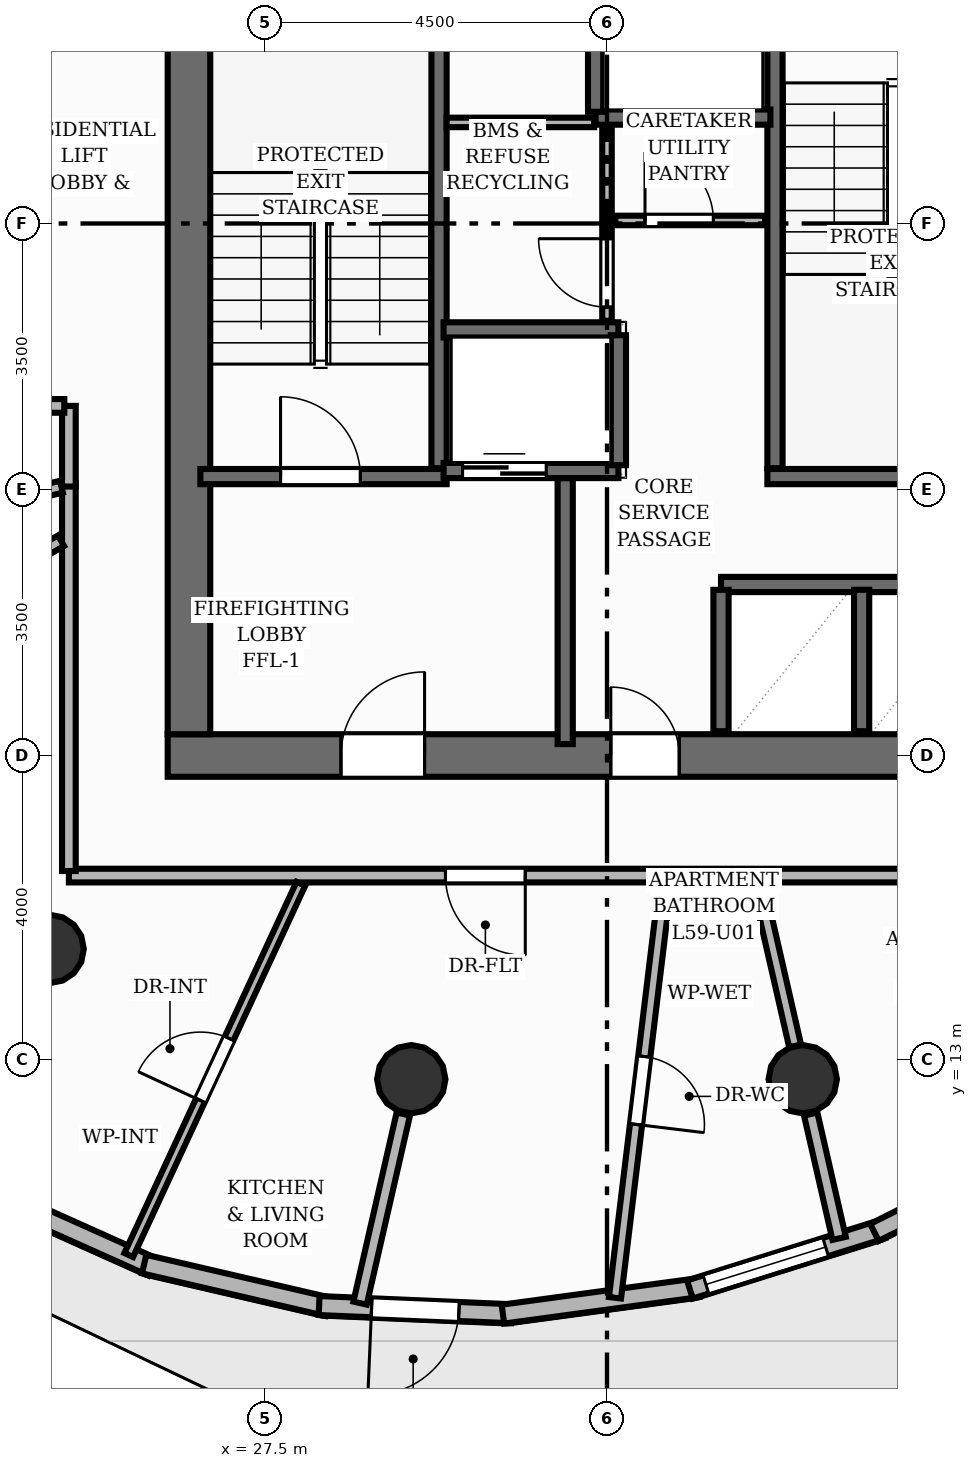
"""IFC4 building model, lengths in metres.
Left out: names, types, materials, properties, quantities, classifications, styles, units other than length and angle.
Written with IfcOpenShell. Run it as: python <this file> out.ifc"""

import sys

from ifc_helpers import new_model, si_unit, direction, frame, frame_2d, origin, origin_2d, place, context, subcontext, project, spatial, rectangle, circle, extrude, element, fill, save


model = new_model("IFC4")
c1 = context("Model", 3, precision=1e-05, world=origin(), true_north=direction((0.0, 1.0)))
c2 = subcontext(c1, "Body", "Model", "MODEL_VIEW")
j1 = project(units=[si_unit("LENGTHUNIT", "METRE"), si_unit("PLANEANGLEUNIT", "RADIAN")], contexts=[c1])
p1 = place(None, origin())
s1 = spatial("IfcSite", under=j1, at=p1, CompositionType="ELEMENT")
p2 = place(p1, origin())
s2 = spatial("IfcBuilding", under=s1, at=p2, CompositionType="ELEMENT")
p3 = place(p2, frame((0.0, 0.0, 198.24)))
s3 = spatial("IfcBuildingStorey", under=s2, at=p3, CompositionType="ELEMENT", Elevation=198.24)
p4 = place(p3, frame((26.22, 17.0, 0.0), z_axis=(0.0, 0.0, 1.0), x_axis=(1.0, 0.0, 0.0)))
e1 = element("IfcWall", 1, at=p4, inside=s3, PredefinedType="SHEAR", context=c2, shape_type="SweptSolid", body=[
    extrude(rectangle(XDim=11.56, YDim=0.56, at=frame_2d((5.78, 0.0))), origin(), (0.0, 0.0, 1.0), 3.2),
])
p5 = place(p4, frame((2.28, 0.0, 0.0)))
e2 = element("IfcOpeningElement", 2, at=p5, cuts=e1, PredefinedType="OPENING", context=c2, shape_type="SweptSolid", body=[
    extrude(rectangle(XDim=1.1, YDim=2.15, at=frame_2d((0.55, 1.075))), frame((0.0, 0.29, 0.0), z_axis=(0.0, -1.0, 0.0), x_axis=(1.0, 0.0, 0.0)), (0.0, 0.0, 1.0), 0.58),
])
p6 = place(p4, frame((5.83, 0.0, 0.0)))
e3 = element("IfcOpeningElement", 3, at=p6, cuts=e1, PredefinedType="OPENING", context=c2, shape_type="SweptSolid", body=[
    extrude(rectangle(XDim=0.9, YDim=2.1, at=frame_2d((0.45, 1.05))), frame((0.0, 0.29, 0.0), z_axis=(0.0, -1.0, 0.0), x_axis=(1.0, 0.0, 0.0)), (0.0, 0.0, 1.0), 0.58),
])
p7 = place(p3, frame((26.5, 17.28, 0.0), z_axis=(0.0, 0.0, 1.0), x_axis=(0.0, 1.0, 0.0)))
e4 = element("IfcWall", 4, at=p7, inside=s3, PredefinedType="SHEAR", context=c2, shape_type="SweptSolid", body=[
    extrude(rectangle(XDim=13.44, YDim=0.56, at=frame_2d((6.72, 0.0))), origin(), (0.0, 0.0, 1.0), 3.2),
])
for number, where, z_axis, x_axis in (
    (5, (24.667, 14.455, 0.0), (0.0, 0.0, 1.0), (1.0, 0.0, 0.0)),
    (6, (29.425, 12.74, 0.0), (0.0, 0.0, 1.0), (1.0, 0.0, 0.0)),
    (7, (34.575, 12.74, 0.0), (0.0, 0.0, 1.0), (1.0, 0.0, 0.0)),
):
    element("IfcColumn", number, at=place(p3, frame(where, z_axis=z_axis, x_axis=x_axis)), inside=s3, PredefinedType="COLUMN", context=c2, shape_type="SweptSolid", body=[
        extrude(circle(Radius=0.45, at=origin_2d()), origin(), (0.0, 0.0, 1.0), 3.2),
    ])
p8 = place(p3, frame((26.018, 10.271, 0.0), z_axis=(0.0, 0.0, 1.0), x_axis=(-0.912451283158, 0.409185356365, 0.0)))
e8 = element("IfcWall", 8, at=p8, inside=s3, PredefinedType="SOLIDWALL", context=c2, shape_type="SweptSolid", body=[
    extrude(rectangle(XDim=2.437, YDim=0.25, at=frame_2d((1.218, 0.0))), origin(), (0.0, 0.0, 1.0), 2.96),
])
p9 = place(p3, frame((28.324, 9.747, 0.0), z_axis=(0.0, 0.0, 1.0), x_axis=(-0.974096425092, 0.226133046286, 0.0)))
e9 = element("IfcWall", 9, at=p9, inside=s3, PredefinedType="SOLIDWALL", context=c2, shape_type="SweptSolid", body=[
    extrude(rectangle(XDim=2.478, YDim=0.25, at=frame_2d((1.239, 0.0))), origin(), (0.0, 0.0, 1.0), 2.96),
])
p10 = place(p3, frame((30.742, 9.655, 0.0), z_axis=(0.0, 0.0, 1.0), x_axis=(-0.999099670747, 0.042424614469, 0.0)))
e10 = element("IfcWall", 10, at=p10, inside=s3, PredefinedType="SOLIDWALL", context=c2, shape_type="SweptSolid", body=[
    extrude(rectangle(XDim=2.532, YDim=0.25, at=frame_2d((1.266, 0.0))), origin(), (0.0, 0.0, 1.0), 2.96),
])
p11 = place(p10, frame((0.691, 0.0, 0.0)))
e11 = element("IfcOpeningElement", 11, at=p11, cuts=e10, PredefinedType="OPENING", context=c2, shape_type="SweptSolid", body=[
    extrude(rectangle(XDim=1.15, YDim=2.2, at=frame_2d((0.575, 1.1))), frame((0.0, 0.135, 0.0), z_axis=(0.0, -1.0, 0.0), x_axis=(1.0, 0.0, 0.0)), (0.0, 0.0, 1.0), 0.27),
])
p12 = place(p3, frame((33.199, 9.998, 0.0), z_axis=(0.0, 0.0, 1.0), x_axis=(-0.990951844978, -0.134217886046, 0.0)))
e12 = element("IfcWall", 12, at=p12, inside=s3, PredefinedType="SOLIDWALL", context=c2, shape_type="SweptSolid", body=[
    extrude(rectangle(XDim=2.592, YDim=0.25, at=frame_2d((1.296, 0.0))), origin(), (0.0, 0.0, 1.0), 2.96),
])
p13 = place(p3, frame((35.621, 10.766, 0.0), z_axis=(0.0, 0.0, 1.0), x_axis=(-0.954307768746, -0.298825505122, 0.0)))
e13 = element("IfcWall", 13, at=p13, inside=s3, PredefinedType="SOLIDWALL", context=c2, shape_type="SweptSolid", body=[
    extrude(rectangle(XDim=2.651, YDim=0.25, at=frame_2d((1.326, 0.0))), origin(), (0.0, 0.0, 1.0), 2.96),
])
p14 = place(p13, frame((0.78, 0.0, 0.85)))
e14 = element("IfcOpeningElement", 14, at=p14, cuts=e13, PredefinedType="OPENING", context=c2, shape_type="SweptSolid", body=[
    extrude(rectangle(XDim=1.65, YDim=1.52, at=frame_2d((0.825, 0.76))), frame((0.0, 0.135, 0.0), z_axis=(0.0, -1.0, 0.0), x_axis=(1.0, 0.0, 0.0)), (0.0, 0.0, 1.0), 0.27),
])
p15 = place(p3, frame((37.934, 11.937, 0.0), z_axis=(0.0, 0.0, 1.0), x_axis=(-0.893757522153, -0.448550433724, 0.0)))
e15 = element("IfcWall", 15, at=p15, inside=s3, PredefinedType="SOLIDWALL", context=c2, shape_type="SweptSolid", body=[
    extrude(rectangle(XDim=2.702, YDim=0.25, at=frame_2d((1.351, 0.0))), origin(), (0.0, 0.0, 1.0), 2.96),
])
p16 = place(p15, frame((0.526, 0.0, 0.85)))
e16 = element("IfcOpeningElement", 16, at=p16, cuts=e15, PredefinedType="OPENING", context=c2, shape_type="SweptSolid", body=[
    extrude(rectangle(XDim=1.65, YDim=1.55, at=frame_2d((0.825, 0.775))), frame((0.0, 0.135, 0.0), z_axis=(0.0, -1.0, 0.0), x_axis=(1.0, 0.0, 0.0)), (0.0, 0.0, 1.0), 0.27),
])
p17 = place(p3, frame((29.79, 20.78, 0.0), z_axis=(0.0, 0.0, 1.0), x_axis=(0.0, 1.0, 0.0)))
e17 = element("IfcWall", 17, at=p17, inside=s3, PredefinedType="SHEAR", context=c2, shape_type="SweptSolid", body=[
    extrude(rectangle(XDim=6.44, YDim=0.2, at=frame_2d((3.22, 0.0))), origin(), (0.0, 0.0, 1.0), 3.2),
])
p18 = place(p3, frame((26.65, 20.67, 0.0), z_axis=(0.0, 0.0, 1.0), x_axis=(1.0, 0.0, 0.0)))
e18 = element("IfcWall", 18, at=p18, inside=s3, PredefinedType="SHEAR", context=c2, shape_type="SweptSolid", body=[
    extrude(rectangle(XDim=3.24, YDim=0.2, at=frame_2d((1.62, 0.0))), origin(), (0.0, 0.0, 1.0), 3.2),
])
p19 = place(p18, frame((1.055, 0.0, 0.0)))
e19 = element("IfcOpeningElement", 19, at=p19, cuts=e18, PredefinedType="OPENING", context=c2, shape_type="SweptSolid", body=[
    extrude(rectangle(XDim=1.05, YDim=2.15, at=frame_2d((0.525, 1.075))), frame((0.0, 0.11, 0.0), z_axis=(0.0, -1.0, 0.0), x_axis=(1.0, 0.0, 0.0)), (0.0, 0.0, 1.0), 0.22),
])
p20 = place(p3, frame((34.21, 20.78, 0.0), z_axis=(0.0, 0.0, 1.0), x_axis=(0.0, 1.0, 0.0)))
e20 = element("IfcWall", 20, at=p20, inside=s3, PredefinedType="SHEAR", context=c2, shape_type="SweptSolid", body=[
    extrude(rectangle(XDim=6.44, YDim=0.2, at=frame_2d((3.22, 0.0))), origin(), (0.0, 0.0, 1.0), 3.2),
])
p21 = place(p3, frame((34.11, 20.67, 0.0), z_axis=(0.0, 0.0, 1.0), x_axis=(1.0, 0.0, 0.0)))
e21 = element("IfcWall", 21, at=p21, inside=s3, PredefinedType="SHEAR", context=c2, shape_type="SweptSolid", body=[
    extrude(rectangle(XDim=3.24, YDim=0.2, at=frame_2d((1.62, 0.0))), origin(), (0.0, 0.0, 1.0), 3.2),
])
p22 = place(p3, frame((31.45, 17.15, 0.0), z_axis=(0.0, 0.0, 1.0), x_axis=(0.0, 1.0, 0.0)))
e22 = element("IfcWall", 22, at=p22, inside=s3, PredefinedType="SHEAR", context=c2, shape_type="SweptSolid", body=[
    extrude(rectangle(XDim=3.5, YDim=0.2, at=frame_2d((1.75, 0.0))), origin(), (0.0, 0.0, 1.0), 3.2),
])
p23 = place(p3, frame((29.85, 20.75, 0.0), z_axis=(0.0, 0.0, 1.0), x_axis=(1.0, 0.0, 0.0)))
e23 = element("IfcWall", 23, at=p23, inside=s3, PredefinedType="SHEAR", context=c2, shape_type="SweptSolid", body=[
    extrude(rectangle(XDim=2.3, YDim=0.2, at=frame_2d((1.15, 0.0))), origin(), (0.0, 0.0, 1.0), 3.2),
])
p24 = place(p23, frame((0.25, 0.0, 0.0)))
e24 = element("IfcOpeningElement", 24, at=p24, cuts=e23, PredefinedType="OPENING", context=c2, shape_type="SweptSolid", body=[
    extrude(rectangle(XDim=1.1, YDim=2.15, at=frame_2d((0.55, 1.075))), frame((0.0, 0.11, 0.0), z_axis=(0.0, -1.0, 0.0), x_axis=(1.0, 0.0, 0.0)), (0.0, 0.0, 1.0), 0.22),
])
p25 = place(p3, frame((29.85, 22.6, 0.0), z_axis=(0.0, 0.0, 1.0), x_axis=(1.0, 0.0, 0.0)))
e25 = element("IfcWall", 25, at=p25, inside=s3, PredefinedType="SHEAR", context=c2, shape_type="SweptSolid", body=[
    extrude(rectangle(XDim=2.3, YDim=0.2, at=frame_2d((1.15, 0.0))), origin(), (0.0, 0.0, 1.0), 3.2),
])
p26 = place(p3, frame((32.15, 20.82, 0.0), z_axis=(0.0, 0.0, 1.0), x_axis=(0.0, 1.0, 0.0)))
e26 = element("IfcWall", 26, at=p26, inside=s3, PredefinedType="SHEAR", context=c2, shape_type="SweptSolid", body=[
    extrude(rectangle(XDim=1.71, YDim=0.2, at=frame_2d((0.855, 0.0))), origin(), (0.0, 0.0, 1.0), 3.2),
])
p27 = place(p3, frame((31.85, 25.4, 0.0), z_axis=(0.0, 0.0, 1.0), x_axis=(1.0, 0.0, 0.0)))
e27 = element("IfcWall", 27, at=p27, inside=s3, PredefinedType="SHEAR", context=c2, shape_type="SweptSolid", body=[
    extrude(rectangle(XDim=2.3, YDim=0.2, at=frame_2d((1.15, 0.0))), origin(), (0.0, 0.0, 1.0), 3.2),
])
p28 = place(p3, frame((31.85, 25.47, 0.0), z_axis=(0.0, 0.0, 1.0), x_axis=(0.0, 1.0, 0.0)))
e28 = element("IfcWall", 28, at=p28, inside=s3, PredefinedType="SHEAR", context=c2, shape_type="SweptSolid", body=[
    extrude(rectangle(XDim=1.71, YDim=0.2, at=frame_2d((0.855, 0.0))), origin(), (0.0, 0.0, 1.0), 3.2),
])
p29 = place(p3, frame((33.5, 19.25, 0.0), z_axis=(0.0, 0.0, 1.0), x_axis=(1.0, 0.0, 0.0)))
e29 = element("IfcWall", 29, at=p29, inside=s3, PredefinedType="SHEAR", context=c2, shape_type="SweptSolid", body=[
    extrude(rectangle(XDim=3.72, YDim=0.2, at=frame_2d((1.86, 0.0))), origin(), (0.0, 0.0, 1.0), 3.2),
])
for number, where, z_axis, x_axis in (
    (30, (33.5, 17.32, 0.0), (0.0, 0.0, 1.0), (0.0, 1.0, 0.0)),
    (31, (35.35, 17.32, 0.0), (0.0, 0.0, 1.0), (0.0, 1.0, 0.0)),
):
    element("IfcWall", number, at=place(p3, frame(where, z_axis=z_axis, x_axis=x_axis)), inside=s3, PredefinedType="SHEAR", context=c2, shape_type="SweptSolid", body=[
        extrude(rectangle(XDim=1.86, YDim=0.2, at=frame_2d((0.93, 0.0))), origin(), (0.0, 0.0, 1.0), 3.2),
    ])
p30 = place(p3, frame((32.0, 22.72, 0.0), z_axis=(0.0, 0.0, 1.0), x_axis=(0.0, 1.0, 0.0)))
e32 = element("IfcWall", 32, at=p30, inside=s3, PredefinedType="PARTITIONING", context=c2, shape_type="SweptSolid", body=[
    extrude(rectangle(XDim=2.52, YDim=0.125, at=frame_2d((1.26, 0.0))), origin(), (0.0, 0.0, 1.0), 2.955),
])
p31 = place(p30, frame((0.18, 0.0, 0.0)))
e33 = element("IfcOpeningElement", 33, at=p31, cuts=e32, PredefinedType="OPENING", context=c2, shape_type="SweptSolid", body=[
    extrude(rectangle(XDim=0.9, YDim=2.1, at=frame_2d((0.45, 1.05))), frame((0.0, 0.073, 0.0), z_axis=(0.0, -1.0, 0.0), x_axis=(1.0, 0.0, 0.0)), (0.0, 0.0, 1.0), 0.145),
])
p32 = place(p3, frame((32.11, 24.04, 0.0), z_axis=(0.0, 0.0, 1.0), x_axis=(1.0, 0.0, 0.0)))
e34 = element("IfcWall", 34, at=p32, inside=s3, PredefinedType="PARTITIONING", context=c2, shape_type="SweptSolid", body=[
    extrude(rectangle(XDim=1.97, YDim=0.125, at=frame_2d((0.985, 0.0))), origin(), (0.0, 0.0, 1.0), 2.955),
])
p33 = place(p32, frame((0.39, 0.0, 0.0)))
e35 = element("IfcOpeningElement", 35, at=p33, cuts=e34, PredefinedType="OPENING", context=c2, shape_type="SweptSolid", body=[
    extrude(rectangle(XDim=0.9, YDim=2.1, at=frame_2d((0.45, 1.05))), frame((0.0, 0.073, 0.0), z_axis=(0.0, -1.0, 0.0), x_axis=(1.0, 0.0, 0.0)), (0.0, 0.0, 1.0), 0.145),
])
p34 = place(p3, frame((29.89, 25.33, 0.0), z_axis=(0.0, 0.0, 1.0), x_axis=(1.0, 0.0, 0.0)))
e36 = element("IfcWall", 36, at=p34, inside=s3, PredefinedType="PARTITIONING", context=c2, shape_type="SweptSolid", body=[
    extrude(rectangle(XDim=1.94, YDim=0.125, at=frame_2d((0.97, 0.0))), origin(), (0.0, 0.0, 1.0), 2.955),
])
p35 = place(p3, frame((29.32, 12.282, 0.0), z_axis=(0.0, 0.0, 1.0), x_axis=(-0.22299363946, -0.974819899654, 0.0)))
e37 = element("IfcWall", 37, at=p35, inside=s3, PredefinedType="PARTITIONING", context=c2, shape_type="SweptSolid", body=[
    extrude(rectangle(XDim=2.552, YDim=0.18, at=frame_2d((1.276, 0.0))), origin(), (0.0, 0.0, 1.0), 2.403),
])
p36 = place(p3, frame((34.68, 12.282, 0.0), z_axis=(0.0, 0.0, 1.0), x_axis=(0.222978827263, -0.97482328788, 0.0)))
e38 = element("IfcWall", 38, at=p36, inside=s3, PredefinedType="PARTITIONING", context=c2, shape_type="SweptSolid", body=[
    extrude(rectangle(XDim=1.678, YDim=0.18, at=frame_2d((0.839, 0.0))), origin(), (0.0, 0.0, 1.0), 2.403),
])
p37 = place(p3, frame((39.08, 15.42, 0.0), z_axis=(0.0, 0.0, 1.0), x_axis=(-1.0, 0.0, 0.0)))
e39 = element("IfcWall", 39, at=p37, inside=s3, PredefinedType="PARTITIONING", context=c2, shape_type="SweptSolid", body=[
    extrude(rectangle(XDim=14.16, YDim=0.18, at=frame_2d((7.08, 0.0))), origin(), (0.0, 0.0, 1.0), 2.955),
])
p38 = place(p37, frame((8.155, 0.0, 0.0)))
e40 = element("IfcOpeningElement", 40, at=p38, cuts=e39, PredefinedType="OPENING", context=c2, shape_type="SweptSolid", body=[
    extrude(rectangle(XDim=1.05, YDim=2.15, at=frame_2d((0.525, 1.075))), frame((0.0, 0.1, 0.0), z_axis=(0.0, -1.0, 0.0), x_axis=(1.0, 0.0, 0.0)), (0.0, 0.0, 1.0), 0.2),
])
p39 = place(p3, frame((24.92, 15.48, 0.0), z_axis=(0.0, 0.0, 1.0), x_axis=(0.0, 1.0, 0.0)))
e41 = element("IfcWall", 41, at=p39, inside=s3, PredefinedType="PARTITIONING", context=c2, shape_type="SweptSolid", body=[
    extrude(rectangle(XDim=5.1, YDim=0.18, at=frame_2d((2.55, 0.0))), origin(), (0.0, 0.0, 1.0), 2.955),
])
p40 = place(p3, frame((24.92, 20.539, 0.0), z_axis=(0.0, 0.0, 1.0), x_axis=(0.0, 1.0, 0.0)))
e42 = element("IfcWall", 42, at=p40, inside=s3, PredefinedType="PARTITIONING", context=c2, shape_type="SweptSolid", body=[
    extrude(rectangle(XDim=1.061, YDim=0.18, at=frame_2d((0.531, 0.0))), origin(), (0.0, 0.0, 1.0), 2.955),
])
p41 = place(p3, frame((24.86, 21.6, 0.0), z_axis=(0.0, 0.0, 1.0), x_axis=(-1.0, 0.0, 0.0)))
e43 = element("IfcWall", 43, at=p41, inside=s3, PredefinedType="PARTITIONING", context=c2, shape_type="SweptSolid", body=[
    extrude(rectangle(XDim=1.79, YDim=0.18, at=frame_2d((0.895, 0.0))), origin(), (0.0, 0.0, 1.0), 2.692),
])
p42 = place(p3, frame((32.768, 15.321, 0.0), z_axis=(0.0, 0.0, 1.0), x_axis=(-0.120556883214, -0.992706420806, 0.0)))
e44 = element("IfcWall", 44, at=p42, inside=s3, PredefinedType="PLUMBINGWALL", context=c2, shape_type="SweptSolid", body=[
    extrude(rectangle(XDim=5.496, YDim=0.16, at=frame_2d((2.748, 0.0))), origin(), (0.0, 0.0, 1.0), 2.692),
])
p43 = place(p42, frame((2.298, 0.0, 0.0)))
e45 = element("IfcOpeningElement", 45, at=p43, cuts=e44, PredefinedType="OPENING", context=c2, shape_type="SweptSolid", body=[
    extrude(rectangle(XDim=0.9, YDim=2.1, at=frame_2d((0.45, 1.05))), frame((0.0, 0.09, 0.0), z_axis=(0.0, -1.0, 0.0), x_axis=(1.0, 0.0, 0.0)), (0.0, 0.0, 1.0), 0.18),
])
p44 = place(p3, frame((25.708, 10.427, 0.0), z_axis=(0.0, 0.0, 1.0), x_axis=(0.420587579127, 0.907251943114, 0.0)))
e46 = element("IfcWall", 46, at=p44, inside=s3, PredefinedType="PARTITIONING", context=c2, shape_type="SweptSolid", body=[
    extrude(rectangle(XDim=5.383, YDim=0.125, at=frame_2d((2.692, 0.0))), origin(), (0.0, 0.0, 1.0), 2.955),
])
p45 = place(p44, frame((2.242, 0.0, 0.0)))
e47 = element("IfcOpeningElement", 47, at=p45, cuts=e46, PredefinedType="OPENING", context=c2, shape_type="SweptSolid", body=[
    extrude(rectangle(XDim=0.9, YDim=2.1, at=frame_2d((0.45, 1.05))), frame((0.0, 0.073, 0.0), z_axis=(0.0, -1.0, 0.0), x_axis=(1.0, 0.0, 0.0)), (0.0, 0.0, 1.0), 0.145),
])
p46 = place(p3, frame((33.985, 15.323, 0.0), z_axis=(0.0, 0.0, 1.0), x_axis=(0.222969522248, -0.974825416241, 0.0)))
e48 = element("IfcWall", 48, at=p46, inside=s3, PredefinedType="PLUMBINGWALL", context=c2, shape_type="SweptSolid", body=[
    extrude(rectangle(XDim=2.199, YDim=0.16, at=frame_2d((1.099, 0.0))), origin(), (0.0, 0.0, 1.0), 2.403),
])
p47 = place(p3, frame((21.412, 17.847, 0.0), z_axis=(0.0, 0.0, 1.0), x_axis=(0.864603029318, 0.502455571861, 0.0)))
e49 = element("IfcWall", 49, at=p47, inside=s3, PredefinedType="PLUMBINGWALL", context=c2, shape_type="SweptSolid", body=[
    extrude(rectangle(XDim=3.938, YDim=0.16, at=frame_2d((1.969, 0.0))), origin(), (0.0, 0.0, 1.0), 2.403),
])
p48 = place(p3, frame((24.823, 20.536, 0.0), z_axis=(0.0, 0.0, 1.0), x_axis=(-0.972855711428, -0.231412542317, 0.0)))
e50 = element("IfcWall", 50, at=p48, inside=s3, PredefinedType="PLUMBINGWALL", context=c2, shape_type="SweptSolid", body=[
    extrude(rectangle(XDim=6.718, YDim=0.16, at=frame_2d((3.359, 0.0))), origin(), (0.0, 0.0, 1.0), 2.692),
])
p49 = place(p48, frame((2.909, 0.0, 0.0)))
e51 = element("IfcOpeningElement", 51, at=p49, cuts=e50, PredefinedType="OPENING", context=c2, shape_type="SweptSolid", body=[
    extrude(rectangle(XDim=0.9, YDim=2.1, at=frame_2d((0.45, 1.05))), frame((0.0, 0.09, 0.0), z_axis=(0.0, -1.0, 0.0), x_axis=(1.0, 0.0, 0.0)), (0.0, 0.0, 1.0), 0.18),
])
p50 = place(p11, origin())
e52 = element("IfcDoor", 52, at=p50, inside=s3, OperationType="SINGLE_SWING_RIGHT", PredefinedType="DOOR", context=c2, shape_type="SweptSolid", body=[
    extrude(rectangle(XDim=1.15, YDim=2.2, at=frame_2d((0.575, 1.1))), frame((0.0, 0.025, 0.0), z_axis=(0.0, -1.0, 0.0), x_axis=(1.0, 0.0, 0.0)), (0.0, 0.0, 1.0), 0.05),
])
fill(e11, e52)
p51 = place(p14, origin())
e53 = element("IfcWindow", 53, at=p51, inside=s3, PartitioningType="SINGLE_PANEL", PredefinedType="WINDOW", context=c2, shape_type="SweptSolid", body=[
    extrude(rectangle(XDim=1.65, YDim=1.52, at=frame_2d((0.825, 0.76))), frame((0.0, 0.03, 0.0), z_axis=(0.0, -1.0, 0.0), x_axis=(1.0, 0.0, 0.0)), (0.0, 0.0, 1.0), 0.06),
])
fill(e14, e53)
p52 = place(p19, origin())
e54 = element("IfcDoor", 54, at=p52, inside=s3, OperationType="SINGLE_SWING_LEFT", PredefinedType="DOOR", context=c2, shape_type="SweptSolid", body=[
    extrude(rectangle(XDim=1.05, YDim=2.15, at=frame_2d((0.525, 1.075))), frame((0.0, 0.025, 0.0), z_axis=(0.0, -1.0, 0.0), x_axis=(1.0, 0.0, 0.0)), (0.0, 0.0, 1.0), 0.05),
])
fill(e19, e54)
p53 = place(p5, origin())
e55 = element("IfcDoor", 55, at=p53, inside=s3, OperationType="SINGLE_SWING_RIGHT", PredefinedType="DOOR", context=c2, shape_type="SweptSolid", body=[
    extrude(rectangle(XDim=1.1, YDim=2.15, at=frame_2d((0.55, 1.075))), frame((0.0, 0.025, 0.0), z_axis=(0.0, -1.0, 0.0), x_axis=(1.0, 0.0, 0.0)), (0.0, 0.0, 1.0), 0.05),
])
fill(e2, e55)
p54 = place(p24, origin())
e56 = element("IfcDoor", 56, at=p54, inside=s3, OperationType="DOUBLE_DOOR_SLIDING", PredefinedType="DOOR", context=c2, shape_type="SweptSolid", body=[
    extrude(rectangle(XDim=1.1, YDim=2.15, at=frame_2d((0.55, 1.075))), frame((0.0, 0.025, 0.0), z_axis=(0.0, -1.0, 0.0), x_axis=(1.0, 0.0, 0.0)), (0.0, 0.0, 1.0), 0.05),
])
fill(e24, e56)
p55 = place(p6, origin())
e57 = element("IfcDoor", 57, at=p55, inside=s3, OperationType="SINGLE_SWING_LEFT", PredefinedType="DOOR", context=c2, shape_type="SweptSolid", body=[
    extrude(rectangle(XDim=0.9, YDim=2.1, at=frame_2d((0.45, 1.05))), frame((0.0, 0.025, 0.0), z_axis=(0.0, -1.0, 0.0), x_axis=(1.0, 0.0, 0.0)), (0.0, 0.0, 1.0), 0.05),
])
fill(e3, e57)
p56 = place(p33, origin())
e58 = element("IfcDoor", 58, at=p56, inside=s3, OperationType="SINGLE_SWING_LEFT", PredefinedType="DOOR", context=c2, shape_type="SweptSolid", body=[
    extrude(rectangle(XDim=0.9, YDim=2.1, at=frame_2d((0.45, 1.05))), frame((0.0, 0.025, 0.0), z_axis=(0.0, -1.0, 0.0), x_axis=(1.0, 0.0, 0.0)), (0.0, 0.0, 1.0), 0.05),
])
fill(e35, e58)
p57 = place(p31, origin())
e59 = element("IfcDoor", 59, at=p57, inside=s3, OperationType="SINGLE_SWING_RIGHT", PredefinedType="DOOR", context=c2, shape_type="SweptSolid", body=[
    extrude(rectangle(XDim=0.9, YDim=2.1, at=frame_2d((0.45, 1.05))), frame((0.0, 0.025, 0.0), z_axis=(0.0, -1.0, 0.0), x_axis=(1.0, 0.0, 0.0)), (0.0, 0.0, 1.0), 0.05),
])
fill(e33, e59)
p58 = place(p38, origin())
e60 = element("IfcDoor", 60, at=p58, inside=s3, OperationType="SINGLE_SWING_LEFT", PredefinedType="DOOR", context=c2, shape_type="SweptSolid", body=[
    extrude(rectangle(XDim=1.05, YDim=2.15, at=frame_2d((0.525, 1.075))), frame((0.0, 0.025, 0.0), z_axis=(0.0, -1.0, 0.0), x_axis=(1.0, 0.0, 0.0)), (0.0, 0.0, 1.0), 0.05),
])
fill(e40, e60)
p59 = place(p43, origin())
e61 = element("IfcDoor", 61, at=p59, inside=s3, OperationType="SINGLE_SWING_RIGHT", PredefinedType="DOOR", context=c2, shape_type="SweptSolid", body=[
    extrude(rectangle(XDim=0.9, YDim=2.1, at=frame_2d((0.45, 1.05))), frame((0.0, 0.025, 0.0), z_axis=(0.0, -1.0, 0.0), x_axis=(1.0, 0.0, 0.0)), (0.0, 0.0, 1.0), 0.05),
])
fill(e45, e61)
p60 = place(p45, origin())
e62 = element("IfcDoor", 62, at=p60, inside=s3, OperationType="SINGLE_SWING_LEFT", PredefinedType="DOOR", context=c2, shape_type="SweptSolid", body=[
    extrude(rectangle(XDim=0.9, YDim=2.1, at=frame_2d((0.45, 1.05))), frame((0.0, 0.025, 0.0), z_axis=(0.0, -1.0, 0.0), x_axis=(1.0, 0.0, 0.0)), (0.0, 0.0, 1.0), 0.05),
])
fill(e47, e62)
save(model, sys.argv[1])
